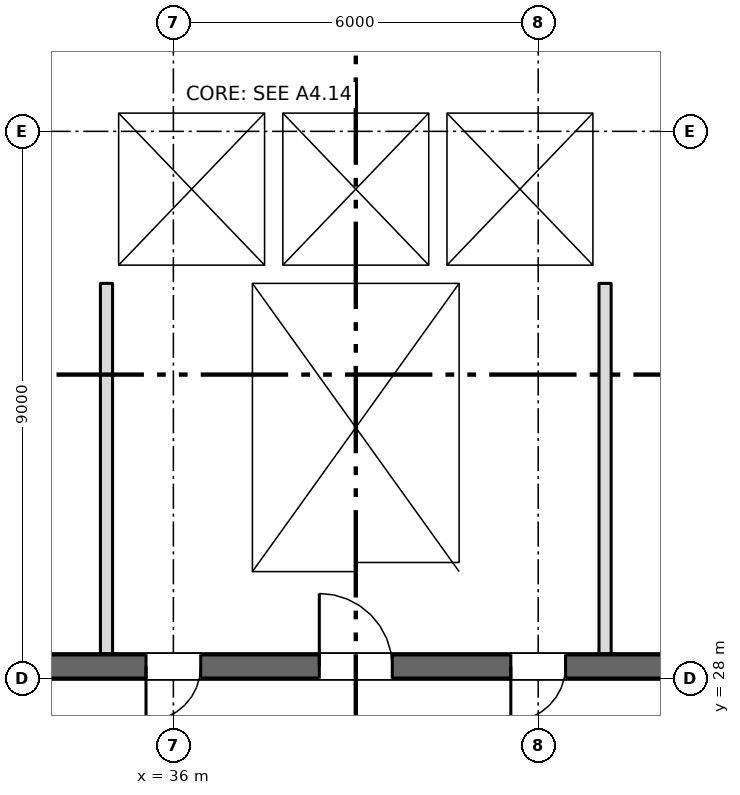
"""IFC4 building model, lengths in metres.
Left out: names, types, materials, properties, quantities, classifications, styles, units other than length and angle.
Written with IfcOpenShell. Run it as: python <this file> out.ifc"""

import sys

from ifc_helpers import new_model, si_unit, direction, frame, frame_2d, origin, place, context, subcontext, project, spatial, rectangle, extrude, element, fill, save


model = new_model("IFC4")
c1 = context("Model", 3, precision=1e-05, world=origin(), true_north=direction((0.0, 1.0)))
c2 = subcontext(c1, "Body", "Model", "MODEL_VIEW")
j1 = project(units=[si_unit("LENGTHUNIT", "METRE"), si_unit("PLANEANGLEUNIT", "RADIAN")], contexts=[c1])
p1 = place(None, origin())
s1 = spatial("IfcSite", under=j1, at=p1, CompositionType="ELEMENT")
p2 = place(p1, origin())
s2 = spatial("IfcBuilding", under=s1, at=p2, CompositionType="ELEMENT")
p3 = place(p2, frame((0.0, 0.0, 90.0)))
s3 = spatial("IfcBuildingStorey", under=s2, at=p3, CompositionType="ELEMENT", Elevation=90.0)
p4 = place(p3, frame((6.7, 28.2, 0.0), z_axis=(0.0, 0.0, 1.0), x_axis=(1.0, 0.0, 0.0)))
e1 = element("IfcWall", 1, at=p4, inside=s3, PredefinedType="SHEAR", context=c2, shape_type="SweptSolid", body=[
    extrude(rectangle(XDim=57.8, YDim=0.4, at=frame_2d((28.9, 0.0))), origin(), (0.0, 0.0, 1.0), 4.2),
])
p5 = place(p4, frame((13.85, 0.0, 0.0)))
e2 = element("IfcOpeningElement", 2, at=p5, cuts=e1, PredefinedType="OPENING", context=c2, shape_type="SweptSolid", body=[
    extrude(rectangle(XDim=0.9, YDim=2.1, at=frame_2d((0.45, 1.05))), frame((0.0, 0.21, 0.0), z_axis=(0.0, -1.0, 0.0), x_axis=(1.0, 0.0, 0.0)), (0.0, 0.0, 1.0), 0.42),
])
p6 = place(p4, frame((49.85, 0.0, 0.0)))
e3 = element("IfcOpeningElement", 3, at=p6, cuts=e1, PredefinedType="OPENING", context=c2, shape_type="SweptSolid", body=[
    extrude(rectangle(XDim=0.9, YDim=2.1, at=frame_2d((0.45, 1.05))), frame((0.0, 0.21, 0.0), z_axis=(0.0, -1.0, 0.0), x_axis=(1.0, 0.0, 0.0)), (0.0, 0.0, 1.0), 0.42),
])
p7 = place(p4, frame((1.35, 0.0, 0.0)))
e4 = element("IfcOpeningElement", 4, at=p7, cuts=e1, PredefinedType="OPENING", context=c2, shape_type="SweptSolid", body=[
    extrude(rectangle(XDim=0.9, YDim=2.1, at=frame_2d((0.45, 1.05))), frame((0.0, 0.21, 0.0), z_axis=(0.0, -1.0, 0.0), x_axis=(1.0, 0.0, 0.0)), (0.0, 0.0, 1.0), 0.42),
])
p8 = place(p4, frame((4.7, 0.0, 0.0)))
e5 = element("IfcOpeningElement", 5, at=p8, cuts=e1, PredefinedType="OPENING", context=c2, shape_type="SweptSolid", body=[
    extrude(rectangle(XDim=1.2, YDim=2.1, at=frame_2d((0.6, 1.05))), frame((0.0, 0.21, 0.0), z_axis=(0.0, -1.0, 0.0), x_axis=(1.0, 0.0, 0.0)), (0.0, 0.0, 1.0), 0.42),
])
p9 = place(p4, frame((31.7, 0.0, 0.0)))
e6 = element("IfcOpeningElement", 6, at=p9, cuts=e1, PredefinedType="OPENING", context=c2, shape_type="SweptSolid", body=[
    extrude(rectangle(XDim=1.2, YDim=2.1, at=frame_2d((0.6, 1.05))), frame((0.0, 0.21, 0.0), z_axis=(0.0, -1.0, 0.0), x_axis=(1.0, 0.0, 0.0)), (0.0, 0.0, 1.0), 0.42),
])
p10 = place(p4, frame((55.2, 0.0, 0.0)))
e7 = element("IfcOpeningElement", 7, at=p10, cuts=e1, PredefinedType="OPENING", context=c2, shape_type="SweptSolid", body=[
    extrude(rectangle(XDim=1.2, YDim=2.1, at=frame_2d((0.6, 1.05))), frame((0.0, 0.21, 0.0), z_axis=(0.0, -1.0, 0.0), x_axis=(1.0, 0.0, 0.0)), (0.0, 0.0, 1.0), 0.42),
])
p11 = place(p4, frame((21.7, 0.0, 0.0)))
e8 = element("IfcOpeningElement", 8, at=p11, cuts=e1, PredefinedType="OPENING", context=c2, shape_type="SweptSolid", body=[
    extrude(rectangle(XDim=1.2, YDim=2.1, at=frame_2d((0.6, 1.05))), frame((0.0, 0.21, 0.0), z_axis=(0.0, -1.0, 0.0), x_axis=(1.0, 0.0, 0.0)), (0.0, 0.0, 1.0), 0.42),
])
p12 = place(p4, frame((41.7, 0.0, 0.0)))
e9 = element("IfcOpeningElement", 9, at=p12, cuts=e1, PredefinedType="OPENING", context=c2, shape_type="SweptSolid", body=[
    extrude(rectangle(XDim=1.2, YDim=2.1, at=frame_2d((0.6, 1.05))), frame((0.0, 0.21, 0.0), z_axis=(0.0, -1.0, 0.0), x_axis=(1.0, 0.0, 0.0)), (0.0, 0.0, 1.0), 0.42),
])
p13 = place(p4, frame((24.85, 0.0, 0.0)))
e10 = element("IfcOpeningElement", 10, at=p13, cuts=e1, PredefinedType="OPENING", context=c2, shape_type="SweptSolid", body=[
    extrude(rectangle(XDim=2.4, YDim=2.1, at=frame_2d((1.2, 1.05))), frame((0.0, 0.21, 0.0), z_axis=(0.0, -1.0, 0.0), x_axis=(1.0, 0.0, 0.0)), (0.0, 0.0, 1.0), 0.42),
])
p14 = place(p4, frame((37.35, 0.0, 0.0)))
e11 = element("IfcOpeningElement", 11, at=p14, cuts=e1, PredefinedType="OPENING", context=c2, shape_type="SweptSolid", body=[
    extrude(rectangle(XDim=2.4, YDim=2.1, at=frame_2d((1.2, 1.05))), frame((0.0, 0.21, 0.0), z_axis=(0.0, -1.0, 0.0), x_axis=(1.0, 0.0, 0.0)), (0.0, 0.0, 1.0), 0.42),
])
p15 = place(p4, frame((7.85, 0.0, 0.0)))
e12 = element("IfcOpeningElement", 12, at=p15, cuts=e1, PredefinedType="OPENING", context=c2, shape_type="SweptSolid", body=[
    extrude(rectangle(XDim=2.4, YDim=2.1, at=frame_2d((1.2, 1.05))), frame((0.0, 0.21, 0.0), z_axis=(0.0, -1.0, 0.0), x_axis=(1.0, 0.0, 0.0)), (0.0, 0.0, 1.0), 0.42),
])
p16 = place(p4, frame((28.85, 0.0, 0.0)))
e13 = element("IfcOpeningElement", 13, at=p16, cuts=e1, PredefinedType="OPENING", context=c2, shape_type="SweptSolid", body=[
    extrude(rectangle(XDim=0.9, YDim=2.1, at=frame_2d((0.45, 1.05))), frame((0.0, 0.21, 0.0), z_axis=(0.0, -1.0, 0.0), x_axis=(1.0, 0.0, 0.0)), (0.0, 0.0, 1.0), 0.42),
])
p17 = place(p4, frame((34.85, 0.0, 0.0)))
e14 = element("IfcOpeningElement", 14, at=p17, cuts=e1, PredefinedType="OPENING", context=c2, shape_type="SweptSolid", body=[
    extrude(rectangle(XDim=0.9, YDim=2.1, at=frame_2d((0.45, 1.05))), frame((0.0, 0.21, 0.0), z_axis=(0.0, -1.0, 0.0), x_axis=(1.0, 0.0, 0.0)), (0.0, 0.0, 1.0), 0.42),
])
for number, where, z_axis, x_axis in (
    (15, (37.15, 28.4, 0.0), (0.0, 0.0, 1.0), (0.0, 1.0, 0.0)),
    (16, (40.85, 28.4, 0.0), (0.0, 0.0, 1.0), (0.0, 1.0, 0.0)),
):
    element("IfcWall", number, at=place(p3, frame(where, z_axis=z_axis, x_axis=x_axis)), inside=s3, PredefinedType="SHEAR", context=c2, shape_type="SweptSolid", body=[
        extrude(rectangle(XDim=6.1, YDim=0.3, at=frame_2d((3.05, 0.0))), origin(), (0.0, 0.0, 1.0), 4.2),
    ])
p18 = place(p3, frame((34.8, 34.65, 0.0), z_axis=(0.0, 0.0, 1.0), x_axis=(1.0, 0.0, 0.0)))
e17 = element("IfcWall", 17, at=p18, inside=s3, PredefinedType="SHEAR", context=c2, shape_type="SweptSolid", body=[
    extrude(rectangle(XDim=8.4, YDim=0.3, at=frame_2d((4.2, 0.0))), origin(), (0.0, 0.0, 1.0), 4.2),
])
p19 = place(p3, frame((34.8, 37.45, 0.0), z_axis=(0.0, 0.0, 1.0), x_axis=(1.0, 0.0, 0.0)))
e18 = element("IfcWall", 18, at=p19, inside=s3, PredefinedType="SHEAR", context=c2, shape_type="SweptSolid", body=[
    extrude(rectangle(XDim=8.4, YDim=0.3, at=frame_2d((4.2, 0.0))), origin(), (0.0, 0.0, 1.0), 4.2),
])
p20 = place(p19, frame((0.95, 0.0, 0.0)))
e19 = element("IfcOpeningElement", 19, at=p20, cuts=e18, PredefinedType="OPENING", context=c2, shape_type="SweptSolid", body=[
    extrude(rectangle(XDim=1.1, YDim=2.1, at=frame_2d((0.55, 1.05))), frame((0.0, 0.16, 0.0), z_axis=(0.0, -1.0, 0.0), x_axis=(1.0, 0.0, 0.0)), (0.0, 0.0, 1.0), 0.32),
])
p21 = place(p19, frame((3.65, 0.0, 0.0)))
e20 = element("IfcOpeningElement", 20, at=p21, cuts=e18, PredefinedType="OPENING", context=c2, shape_type="SweptSolid", body=[
    extrude(rectangle(XDim=1.1, YDim=2.1, at=frame_2d((0.55, 1.05))), frame((0.0, 0.16, 0.0), z_axis=(0.0, -1.0, 0.0), x_axis=(1.0, 0.0, 0.0)), (0.0, 0.0, 1.0), 0.32),
])
p22 = place(p19, frame((6.35, 0.0, 0.0)))
e21 = element("IfcOpeningElement", 21, at=p22, cuts=e18, PredefinedType="OPENING", context=c2, shape_type="SweptSolid", body=[
    extrude(rectangle(XDim=1.1, YDim=2.1, at=frame_2d((0.55, 1.05))), frame((0.0, 0.16, 0.0), z_axis=(0.0, -1.0, 0.0), x_axis=(1.0, 0.0, 0.0)), (0.0, 0.0, 1.0), 0.32),
])
for number, where, z_axis, x_axis in (
    (22, (34.95, 34.8, 0.0), (0.0, 0.0, 1.0), (0.0, 1.0, 0.0)),
    (23, (43.05, 34.8, 0.0), (0.0, 0.0, 1.0), (0.0, 1.0, 0.0)),
    (24, (37.65, 34.8, 0.0), (0.0, 0.0, 1.0), (0.0, 1.0, 0.0)),
    (25, (40.35, 34.8, 0.0), (0.0, 0.0, 1.0), (0.0, 1.0, 0.0)),
):
    element("IfcWall", number, at=place(p3, frame(where, z_axis=z_axis, x_axis=x_axis)), inside=s3, PredefinedType="SHEAR", context=c2, shape_type="SweptSolid", body=[
        extrude(rectangle(XDim=2.5, YDim=0.3, at=frame_2d((1.25, 0.0))), origin(), (0.0, 0.0, 1.0), 4.2),
    ])
for number, where, z_axis, x_axis in (
    (26, (34.9, 28.4, 0.0), (0.0, 0.0, 1.0), (0.0, 1.0, 0.0)),
    (27, (43.1, 28.4, 0.0), (0.0, 0.0, 1.0), (0.0, 1.0, 0.0)),
):
    element("IfcWall", number, at=place(p3, frame(where, z_axis=z_axis, x_axis=x_axis)), inside=s3, PredefinedType="PARTITIONING", context=c2, shape_type="SweptSolid", body=[
        extrude(rectangle(XDim=6.1, YDim=0.2, at=frame_2d((3.05, 0.0))), origin(), (0.0, 0.0, 1.0), 4.2),
    ])
p23 = place(p20, origin())
e28 = element("IfcDoor", 28, at=p23, inside=s3, OperationType="SLIDING_TO_LEFT", PredefinedType="DOOR", context=c2, shape_type="SweptSolid", body=[
    extrude(rectangle(XDim=1.1, YDim=2.1, at=frame_2d((0.55, 1.05))), frame((0.0, 0.025, 0.0), z_axis=(0.0, -1.0, 0.0), x_axis=(1.0, 0.0, 0.0)), (0.0, 0.0, 1.0), 0.05),
])
fill(e19, e28)
p24 = place(p21, origin())
e29 = element("IfcDoor", 29, at=p24, inside=s3, OperationType="SLIDING_TO_LEFT", PredefinedType="DOOR", context=c2, shape_type="SweptSolid", body=[
    extrude(rectangle(XDim=1.1, YDim=2.1, at=frame_2d((0.55, 1.05))), frame((0.0, 0.025, 0.0), z_axis=(0.0, -1.0, 0.0), x_axis=(1.0, 0.0, 0.0)), (0.0, 0.0, 1.0), 0.05),
])
fill(e20, e29)
p25 = place(p22, origin())
e30 = element("IfcDoor", 30, at=p25, inside=s3, OperationType="SLIDING_TO_LEFT", PredefinedType="DOOR", context=c2, shape_type="SweptSolid", body=[
    extrude(rectangle(XDim=1.1, YDim=2.1, at=frame_2d((0.55, 1.05))), frame((0.0, 0.025, 0.0), z_axis=(0.0, -1.0, 0.0), x_axis=(1.0, 0.0, 0.0)), (0.0, 0.0, 1.0), 0.05),
])
fill(e21, e30)
p26 = place(p9, origin())
e31 = element("IfcDoor", 31, at=p26, inside=s3, OperationType="SINGLE_SWING_LEFT", PredefinedType="DOOR", context=c2, shape_type="SweptSolid", body=[
    extrude(rectangle(XDim=1.2, YDim=2.1, at=frame_2d((0.6, 1.05))), frame((0.0, 0.025, 0.0), z_axis=(0.0, -1.0, 0.0), x_axis=(1.0, 0.0, 0.0)), (0.0, 0.0, 1.0), 0.05),
])
fill(e6, e31)
p27 = place(p16, origin())
e32 = element("IfcDoor", 32, at=p27, inside=s3, OperationType="SINGLE_SWING_LEFT", PredefinedType="DOOR", context=c2, shape_type="SweptSolid", body=[
    extrude(rectangle(XDim=0.9, YDim=2.1, at=frame_2d((0.45, 1.05))), frame((0.0, 0.025, 0.0), z_axis=(0.0, -1.0, 0.0), x_axis=(1.0, 0.0, 0.0)), (0.0, 0.0, 1.0), 0.05),
])
fill(e13, e32)
p28 = place(p17, origin())
e33 = element("IfcDoor", 33, at=p28, inside=s3, OperationType="SINGLE_SWING_LEFT", PredefinedType="DOOR", context=c2, shape_type="SweptSolid", body=[
    extrude(rectangle(XDim=0.9, YDim=2.1, at=frame_2d((0.45, 1.05))), frame((0.0, 0.025, 0.0), z_axis=(0.0, -1.0, 0.0), x_axis=(1.0, 0.0, 0.0)), (0.0, 0.0, 1.0), 0.05),
])
fill(e14, e33)
save(model, sys.argv[1])
